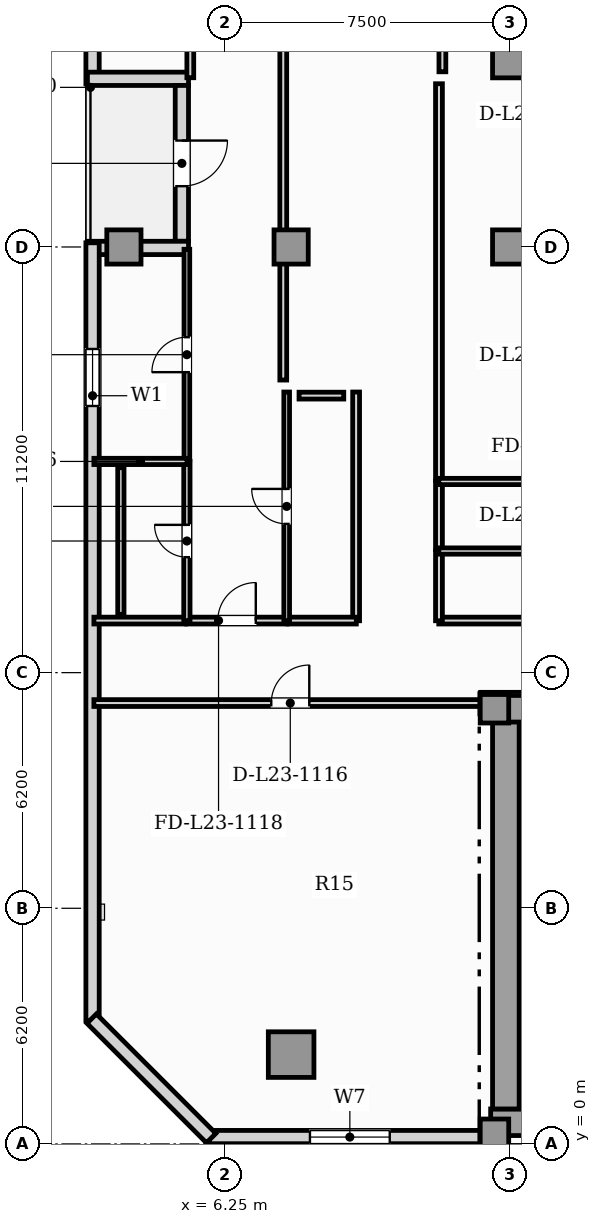
"""IFC4 building model, lengths in metres.
Left out: names, types, materials, properties, quantities, classifications, styles, units other than length and angle.
Written with IfcOpenShell. Run it as: python <this file> out.ifc"""

import sys

from ifc_helpers import new_model, si_unit, direction, frame, frame_2d, origin, origin_2d, place, context, subcontext, project, spatial, rectangle, hollow_rectangle, extrude, element, fill, save


model = new_model("IFC4")
c1 = context("Model", 3, precision=1e-05, world=origin(), true_north=direction((0.0, 1.0)))
c2 = subcontext(c1, "Body", "Model", "MODEL_VIEW")
j1 = project(units=[si_unit("LENGTHUNIT", "METRE"), si_unit("PLANEANGLEUNIT", "RADIAN")], contexts=[c1])
p1 = place(None, origin())
s1 = spatial("IfcSite", under=j1, at=p1, CompositionType="ELEMENT")
p2 = place(p1, origin())
s2 = spatial("IfcBuilding", under=s1, at=p2, CompositionType="ELEMENT")
p3 = place(p2, frame((0.0, 0.0, 96.45)))
s3 = spatial("IfcBuildingStorey", under=s2, at=p3, CompositionType="ELEMENT", Elevation=96.45)
p4 = place(p3, frame((13.25, 0.57, 0.0), z_axis=(0.0, 0.0, 1.0), x_axis=(1.0, 0.0, 0.0)))
e1 = element("IfcWall", 1, at=p4, inside=s3, PredefinedType="SHEAR", context=c2, shape_type="SweptSolid", body=[
    extrude(rectangle(XDim=31.0, YDim=0.7, at=frame_2d((15.5, 0.0))), origin(), (0.0, 0.0, 1.0), 3.6),
])
p5 = place(p3, frame((13.65, 0.92, 0.0), z_axis=(0.0, 0.0, 1.0), x_axis=(0.0, 1.0, 0.0)))
e2 = element("IfcWall", 2, at=p5, inside=s3, PredefinedType="SHEAR", context=c2, shape_type="SweptSolid", body=[
    extrude(rectangle(XDim=10.53, YDim=0.7, at=frame_2d((5.265, 0.0))), origin(), (0.0, 0.0, 1.0), 3.6),
])
p6 = place(p3, frame((13.25, 11.45, 0.0), z_axis=(0.0, 0.0, 1.0), x_axis=(1.0, 0.0, 0.0)))
e3 = element("IfcWall", 3, at=p6, inside=s3, PredefinedType="SHEAR", context=c2, shape_type="SweptSolid", body=[
    extrude(rectangle(XDim=2.95, YDim=0.7, at=frame_2d((1.475, 0.0))), origin(), (0.0, 0.0, 1.0), 3.6),
])
for number, where, z_axis, x_axis in (
    (4, (13.35, 0.28, 0.0), (0.0, 0.0, 1.0), (1.0, 0.0, 0.0)),
    (5, (13.35, 11.45, 0.0), (0.0, 0.0, 1.0), (1.0, 0.0, 0.0)),
):
    element("IfcColumn", number, at=place(p3, frame(where, z_axis=z_axis, x_axis=x_axis)), inside=s3, PredefinedType="COLUMN", context=c2, shape_type="SweptSolid", body=[
        extrude(rectangle(XDim=0.75, YDim=0.75, at=origin_2d()), origin(), (0.0, 0.0, 1.0), 3.85),
    ])
p7 = place(p3, frame((8.0, 2.35, 0.0), z_axis=(0.0, 0.0, 1.0), x_axis=(1.0, 0.0, 0.0)))
e6 = element("IfcColumn", 6, at=p7, inside=s3, PredefinedType="USERDEFINED", context=c2, shape_type="SweptSolid", body=[
    extrude(hollow_rectangle(XDim=1.2, YDim=1.2, WallThickness=0.07, at=origin_2d()), origin(), (0.0, 0.0, 1.0), 3.85),
])
for number, where, z_axis, x_axis in (
    (7, (3.6, 23.6, 0.0), (0.0, 0.0, 1.0), (1.0, 0.0, 0.0)),
    (8, (8.0, 23.6, 0.0), (0.0, 0.0, 1.0), (1.0, 0.0, 0.0)),
    (9, (13.75, 23.6, 0.0), (0.0, 0.0, 1.0), (1.0, 0.0, 0.0)),
    (10, (13.75, 28.5, 0.0), (0.0, 0.0, 1.0), (1.0, 0.0, 0.0)),
):
    element("IfcColumn", number, at=place(p3, frame(where, z_axis=z_axis, x_axis=x_axis)), inside=s3, PredefinedType="COLUMN", context=c2, shape_type="SweptSolid", body=[
        extrude(rectangle(XDim=0.9, YDim=0.9, at=origin_2d()), origin(), (0.0, 0.0, 1.0), 3.85),
    ])
p8 = place(p3, frame((5.84, 0.18, 0.0), z_axis=(0.0, 0.0, 1.0), x_axis=(1.0, 0.0, 0.0)))
e11 = element("IfcWall", 11, at=p8, inside=s3, PredefinedType="SOLIDWALL", context=c2, shape_type="SweptSolid", body=[
    extrude(rectangle(XDim=7.41, YDim=0.35, at=frame_2d((3.705, 0.0))), origin(), (0.0, 0.0, 1.0), 3.6),
])
p9 = place(p8, frame((2.655, 0.0, 0.85)))
e12 = element("IfcOpeningElement", 12, at=p9, cuts=e11, PredefinedType="OPENING", context=c2, shape_type="SweptSolid", body=[
    extrude(rectangle(XDim=2.1, YDim=2.05, at=frame_2d((1.05, 1.025))), frame((0.0, 0.185, 0.0), z_axis=(0.0, -1.0, 0.0), x_axis=(1.0, 0.0, 0.0)), (0.0, 0.0, 1.0), 0.37),
])
p10 = place(p3, frame((2.775, 39.96, 0.0), z_axis=(0.0, 0.0, 1.0), x_axis=(0.0, -1.0, 0.0)))
e13 = element("IfcWall", 13, at=p10, inside=s3, PredefinedType="SOLIDWALL", context=c2, shape_type="SweptSolid", body=[
    extrude(rectangle(XDim=12.07, YDim=0.35, at=frame_2d((6.035, 0.0))), origin(), (0.0, 0.0, 1.0), 3.6),
])
p11 = place(p10, frame((5.26, 0.0, 0.95)))
e14 = element("IfcOpeningElement", 14, at=p11, cuts=e13, PredefinedType="OPENING", context=c2, shape_type="SweptSolid", body=[
    extrude(rectangle(XDim=0.9, YDim=1.5, at=frame_2d((0.45, 0.75))), frame((0.0, 0.185, 0.0), z_axis=(0.0, -1.0, 0.0), x_axis=(1.0, 0.0, 0.0)), (0.0, 0.0, 1.0), 0.37),
])
p12 = place(p3, frame((2.64, 28.025, 0.0), z_axis=(0.0, 0.0, 1.0), x_axis=(1.0, 0.0, 0.0)))
e15 = element("IfcWall", 15, at=p12, inside=s3, PredefinedType="SOLIDWALL", context=c2, shape_type="SweptSolid", body=[
    extrude(rectangle(XDim=2.66, YDim=0.35, at=frame_2d((1.33, 0.0))), origin(), (0.0, 0.0, 1.0), 3.6),
])
p13 = place(p3, frame((5.125, 27.85, 0.0), z_axis=(0.0, 0.0, 1.0), x_axis=(0.0, -1.0, 0.0)))
e16 = element("IfcWall", 16, at=p13, inside=s3, PredefinedType="SOLIDWALL", context=c2, shape_type="SweptSolid", body=[
    extrude(rectangle(XDim=4.1, YDim=0.35, at=frame_2d((2.05, 0.0))), origin(), (0.0, 0.0, 1.0), 3.6),
])
p14 = place(p13, frame((1.45, 0.0, 0.0)))
e17 = element("IfcOpeningElement", 17, at=p14, cuts=e16, PredefinedType="OPENING", context=c2, shape_type="SweptSolid", body=[
    extrude(rectangle(XDim=1.2, YDim=2.2, at=frame_2d((0.6, 1.1))), frame((0.0, 0.185, 0.0), z_axis=(0.0, -1.0, 0.0), x_axis=(1.0, 0.0, 0.0)), (0.0, 0.0, 1.0), 0.37),
])
p15 = place(p3, frame((5.3, 23.575, 0.0), z_axis=(0.0, 0.0, 1.0), x_axis=(-1.0, 0.0, 0.0)))
e18 = element("IfcWall", 18, at=p15, inside=s3, PredefinedType="SOLIDWALL", context=c2, shape_type="SweptSolid", body=[
    extrude(rectangle(XDim=2.66, YDim=0.35, at=frame_2d((1.33, 0.0))), origin(), (0.0, 0.0, 1.0), 3.056),
])
p16 = place(p3, frame((2.775, 23.71, 0.0), z_axis=(0.0, 0.0, 1.0), x_axis=(0.0, -1.0, 0.0)))
e19 = element("IfcWall", 19, at=p16, inside=s3, PredefinedType="SOLIDWALL", context=c2, shape_type="SweptSolid", body=[
    extrude(rectangle(XDim=20.47, YDim=0.35, at=frame_2d((10.235, 0.0))), origin(), (0.0, 0.0, 1.0), 3.6),
])
p17 = place(p16, frame((2.794, 0.0, 0.9)))
e20 = element("IfcOpeningElement", 20, at=p17, cuts=e19, PredefinedType="OPENING", context=c2, shape_type="SweptSolid", body=[
    extrude(rectangle(XDim=1.5, YDim=1.95, at=frame_2d((0.75, 0.975))), frame((0.0, 0.185, 0.0), z_axis=(0.0, -1.0, 0.0), x_axis=(1.0, 0.0, 0.0)), (0.0, 0.0, 1.0), 0.37),
])
p18 = place(p3, frame((2.752, 3.295, 0.0), z_axis=(0.0, 0.0, 1.0), x_axis=(0.707134240044, -0.707079321262, 0.0)))
e21 = element("IfcWall", 21, at=p18, inside=s3, PredefinedType="SOLIDWALL", context=c2, shape_type="SweptSolid", body=[
    extrude(rectangle(XDim=4.446, YDim=0.35, at=frame_2d((2.223, 0.0))), origin(), (0.0, 0.0, 1.0), 3.6),
])
p19 = place(p3, frame((14.04, 8.52, 0.0), z_axis=(0.0, 0.0, 1.0), x_axis=(1.0, 0.0, 0.0)))
e22 = element("IfcWall", 22, at=p19, inside=s3, PredefinedType="SOLIDWALL", context=c2, shape_type="SweptSolid", body=[
    extrude(rectangle(XDim=3.4, YDim=0.22, at=frame_2d((1.7, 0.0))), origin(), (0.0, 0.0, 1.0), 3.6),
])
p20 = place(p19, frame((1.125, 0.0, 0.0)))
e23 = element("IfcOpeningElement", 23, at=p20, cuts=e22, PredefinedType="OPENING", context=c2, shape_type="SweptSolid", body=[
    extrude(rectangle(XDim=1.15, YDim=2.2, at=frame_2d((0.575, 1.1))), frame((0.0, 0.12, 0.0), z_axis=(0.0, -1.0, 0.0), x_axis=(1.0, 0.0, 0.0)), (0.0, 0.0, 1.0), 0.24),
])
p21 = place(p3, frame((2.81, 11.6, 0.0), z_axis=(0.0, 0.0, 1.0), x_axis=(1.0, 0.0, 0.0)))
e24 = element("IfcWall", 24, at=p21, inside=s3, PredefinedType="PARTITIONING", context=c2, shape_type="SweptSolid", body=[
    extrude(rectangle(XDim=10.335, YDim=0.18, at=frame_2d((5.167, 0.0))), origin(), (0.0, 0.0, 1.0), 3.6),
])
p22 = place(p21, frame((4.667, 0.0, 0.0)))
e25 = element("IfcOpeningElement", 25, at=p22, cuts=e24, PredefinedType="OPENING", context=c2, shape_type="SweptSolid", body=[
    extrude(rectangle(XDim=1.0, YDim=2.15, at=frame_2d((0.5, 1.075))), frame((0.0, 0.1, 0.0), z_axis=(0.0, -1.0, 0.0), x_axis=(1.0, 0.0, 0.0)), (0.0, 0.0, 1.0), 0.2),
])
p23 = place(p3, frame((5.252, 13.77, 0.0), z_axis=(0.0, 0.0, 1.0), x_axis=(1.0, 0.0, 0.0)))
e26 = element("IfcWall", 26, at=p23, inside=s3, PredefinedType="PARTITIONING", context=c2, shape_type="SweptSolid", body=[
    extrude(rectangle(XDim=2.636, YDim=0.18, at=frame_2d((1.318, 0.0))), origin(), (0.0, 0.0, 1.0), 3.6),
])
p24 = place(p23, frame((0.818, 0.0, 0.0)))
e27 = element("IfcOpeningElement", 27, at=p24, cuts=e26, PredefinedType="OPENING", context=c2, shape_type="SweptSolid", body=[
    extrude(rectangle(XDim=1.0, YDim=2.15, at=frame_2d((0.5, 1.075))), frame((0.0, 0.1, 0.0), z_axis=(0.0, -1.0, 0.0), x_axis=(1.0, 0.0, 0.0)), (0.0, 0.0, 1.0), 0.2),
])
p25 = place(p3, frame((2.81, 13.77, 0.0), z_axis=(0.0, 0.0, 1.0), x_axis=(1.0, 0.0, 0.0)))
e28 = element("IfcWall", 28, at=p25, inside=s3, PredefinedType="PARTITIONING", context=c2, shape_type="SweptSolid", body=[
    extrude(rectangle(XDim=2.412, YDim=0.18, at=frame_2d((1.206, 0.0))), origin(), (0.0, 0.0, 1.0), 3.6),
])
p26 = place(p3, frame((9.71, 13.765, 0.0), z_axis=(0.0, 0.0, 1.0), x_axis=(0.0, 1.0, 0.0)))
e29 = element("IfcWall", 29, at=p26, inside=s3, PredefinedType="PARTITIONING", context=c2, shape_type="SweptSolid", body=[
    extrude(rectangle(XDim=6.019, YDim=0.18, at=frame_2d((3.009, 0.0))), origin(), (0.0, 0.0, 1.0), 3.6),
])
p27 = place(p3, frame((7.918, 13.77, 0.0), z_axis=(0.0, 0.0, 1.0), x_axis=(1.0, 0.0, 0.0)))
e30 = element("IfcWall", 30, at=p27, inside=s3, PredefinedType="PARTITIONING", context=c2, shape_type="SweptSolid", body=[
    extrude(rectangle(XDim=1.797, YDim=0.18, at=frame_2d((0.898, 0.0))), origin(), (0.0, 0.0, 1.0), 3.6),
])
p28 = place(p3, frame((11.885, 13.77, 0.0), z_axis=(0.0, 0.0, 1.0), x_axis=(1.0, 0.0, 0.0)))
e31 = element("IfcWall", 31, at=p28, inside=s3, PredefinedType="PARTITIONING", context=c2, shape_type="SweptSolid", body=[
    extrude(rectangle(XDim=5.795, YDim=0.18, at=frame_2d((2.898, 0.0))), origin(), (0.0, 0.0, 1.0), 3.6),
])
p29 = place(p3, frame((11.89, 13.765, 0.0), z_axis=(0.0, 0.0, 1.0), x_axis=(0.0, 1.0, 0.0)))
e32 = element("IfcWall", 32, at=p29, inside=s3, PredefinedType="PARTITIONING", context=c2, shape_type="SweptSolid", body=[
    extrude(rectangle(XDim=1.84, YDim=0.18, at=frame_2d((0.92, 0.0))), origin(), (0.0, 0.0, 1.0), 3.6),
])
p30 = place(p3, frame((11.89, 15.635, 0.0), z_axis=(0.0, 0.0, 1.0), x_axis=(0.0, 1.0, 0.0)))
e33 = element("IfcWall", 33, at=p30, inside=s3, PredefinedType="PARTITIONING", context=c2, shape_type="SweptSolid", body=[
    extrude(rectangle(XDim=1.8, YDim=0.18, at=frame_2d((0.9, 0.0))), origin(), (0.0, 0.0, 1.0), 3.6),
])
p31 = place(p3, frame((11.89, 17.465, 0.0), z_axis=(0.0, 0.0, 1.0), x_axis=(0.0, 1.0, 0.0)))
e34 = element("IfcWall", 34, at=p31, inside=s3, PredefinedType="PARTITIONING", context=c2, shape_type="SweptSolid", body=[
    extrude(rectangle(XDim=10.43, YDim=0.18, at=frame_2d((5.215, 0.0))), origin(), (0.0, 0.0, 1.0), 3.6),
])
p32 = place(p3, frame((5.257, 13.765, 0.0), z_axis=(0.0, 0.0, 1.0), x_axis=(0.0, 1.0, 0.0)))
e35 = element("IfcWall", 35, at=p32, inside=s3, PredefinedType="PLUMBINGWALL", context=c2, shape_type="SweptSolid", body=[
    extrude(rectangle(XDim=4.198, YDim=0.165, at=frame_2d((2.099, 0.0))), origin(), (0.0, 0.0, 1.0), 3.6),
])
p33 = place(p32, frame((1.674, 0.0, 0.0)))
e36 = element("IfcOpeningElement", 36, at=p33, cuts=e35, PredefinedType="OPENING", context=c2, shape_type="SweptSolid", body=[
    extrude(rectangle(XDim=0.85, YDim=2.1, at=frame_2d((0.425, 1.05))), frame((0.0, 0.093, 0.0), z_axis=(0.0, -1.0, 0.0), x_axis=(1.0, 0.0, 0.0)), (0.0, 0.0, 1.0), 0.185),
])
p34 = place(p3, frame((5.257, 17.992, 0.0), z_axis=(0.0, 0.0, 1.0), x_axis=(0.0, 1.0, 0.0)))
e37 = element("IfcWall", 37, at=p34, inside=s3, PredefinedType="PARTITIONING", context=c2, shape_type="SweptSolid", body=[
    extrude(rectangle(XDim=5.548, YDim=0.15, at=frame_2d((2.774, 0.0))), origin(), (0.0, 0.0, 1.0), 3.6),
])
p35 = place(p34, frame((2.314, 0.0, 0.0)))
e38 = element("IfcOpeningElement", 38, at=p35, cuts=e37, PredefinedType="OPENING", context=c2, shape_type="SweptSolid", body=[
    extrude(rectangle(XDim=0.92, YDim=2.1, at=frame_2d((0.46, 1.05))), frame((0.0, 0.085, 0.0), z_axis=(0.0, -1.0, 0.0), x_axis=(1.0, 0.0, 0.0)), (0.0, 0.0, 1.0), 0.17),
])
p36 = place(p3, frame((7.883, 13.765, 0.0), z_axis=(0.0, 0.0, 1.0), x_axis=(0.0, 1.0, 0.0)))
e39 = element("IfcWall", 39, at=p36, inside=s3, PredefinedType="PARTITIONING", context=c2, shape_type="SweptSolid", body=[
    extrude(rectangle(XDim=6.019, YDim=0.15, at=frame_2d((3.009, 0.0))), origin(), (0.0, 0.0, 1.0), 3.056),
])
p37 = place(p36, frame((2.549, 0.0, 0.0)))
e40 = element("IfcOpeningElement", 40, at=p37, cuts=e39, PredefinedType="OPENING", context=c2, shape_type="SweptSolid", body=[
    extrude(rectangle(XDim=0.92, YDim=2.1, at=frame_2d((0.46, 1.05))), frame((0.0, 0.085, 0.0), z_axis=(0.0, -1.0, 0.0), x_axis=(1.0, 0.0, 0.0)), (0.0, 0.0, 1.0), 0.17),
])
p38 = place(p3, frame((2.81, 17.957, 0.0), z_axis=(0.0, 0.0, 1.0), x_axis=(1.0, 0.0, 0.0)))
e41 = element("IfcWall", 41, at=p38, inside=s3, PredefinedType="PLUMBINGWALL", context=c2, shape_type="SweptSolid", body=[
    extrude(rectangle(XDim=2.452, YDim=0.165, at=frame_2d((1.226, 0.0))), origin(), (0.0, 0.0, 1.0), 3.6),
])
for number, where, z_axis, x_axis in (
    (42, (11.885, 15.6, 0.0), (0.0, 0.0, 1.0), (1.0, 0.0, 0.0)),
    (43, (11.885, 17.43, 0.0), (0.0, 0.0, 1.0), (1.0, 0.0, 0.0)),
):
    element("IfcWall", number, at=place(p3, frame(where, z_axis=z_axis, x_axis=x_axis)), inside=s3, PredefinedType="PLUMBINGWALL", context=c2, shape_type="SweptSolid", body=[
        extrude(rectangle(XDim=5.835, YDim=0.165, at=frame_2d((2.918, 0.0))), origin(), (0.0, 0.0, 1.0), 3.6),
    ])
p39 = place(p3, frame((5.347, 28.053, 0.0), z_axis=(0.0, 0.0, 1.0), x_axis=(0.0, 1.0, 0.0)))
e44 = element("IfcWall", 44, at=p39, inside=s3, PredefinedType="PARTITIONING", context=c2, shape_type="SweptSolid", body=[
    extrude(rectangle(XDim=5.632, YDim=0.18, at=frame_2d((2.816, 0.0))), origin(), (0.0, 0.0, 1.0), 3.6),
])
p40 = place(p3, frame((7.793, 33.685, 0.0), z_axis=(0.0, 0.0, 1.0), x_axis=(0.0, -1.0, 0.0)))
e45 = element("IfcWall", 45, at=p40, inside=s3, PredefinedType="PARTITIONING", context=c2, shape_type="SweptSolid", body=[
    extrude(rectangle(XDim=13.586, YDim=0.18, at=frame_2d((6.793, 0.0))), origin(), (0.0, 0.0, 1.0), 3.056),
])
p41 = place(p3, frame((3.52, 13.935, 0.0), z_axis=(0.0, 0.0, 1.0), x_axis=(0.0, 1.0, 0.0)))
e46 = element("IfcWall", 46, at=p41, inside=s3, PredefinedType="PLUMBINGWALL", context=c2, shape_type="SweptSolid", body=[
    extrude(rectangle(XDim=3.857, YDim=0.165, at=frame_2d((1.929, 0.0))), origin(), (0.0, 0.0, 1.0), 3.6),
])
p42 = place(p3, frame((8.208, 19.689, 0.0), z_axis=(0.0, 0.0, 1.0), x_axis=(1.0, 0.0, 0.0)))
e47 = element("IfcWall", 47, at=p42, inside=s3, PredefinedType="PARTITIONING", context=c2, shape_type="SweptSolid", body=[
    extrude(rectangle(XDim=1.177, YDim=0.18, at=frame_2d((0.588, 0.0))), origin(), (0.0, 0.0, 1.0), 3.6),
])
p43 = place(p3, frame((11.98, 28.21, 0.0), z_axis=(0.0, 0.0, 1.0), x_axis=(0.0, 1.0, 0.0)))
e48 = element("IfcWall", 48, at=p43, inside=s3, PredefinedType="PARTITIONING", context=c2, shape_type="SweptSolid", body=[
    extrude(rectangle(XDim=2.867, YDim=0.18, at=frame_2d((1.434, 0.0))), origin(), (0.0, 0.0, 1.0), 3.6),
])
p44 = place(p14, frame((1.2, 0.0, 0.0), z_axis=(0.0, 0.0, 1.0), x_axis=(-1.0, 0.0, 0.0)))
e49 = element("IfcDoor", 49, at=p44, inside=s3, OperationType="SINGLE_SWING_RIGHT", PredefinedType="DOOR", context=c2, shape_type="SweptSolid", body=[
    extrude(rectangle(XDim=1.2, YDim=2.2, at=frame_2d((0.6, 1.1))), frame((0.0, 0.025, 0.0), z_axis=(0.0, -1.0, 0.0), x_axis=(1.0, 0.0, 0.0)), (0.0, 0.0, 1.0), 0.05),
])
fill(e17, e49)
p45 = place(p9, origin())
e50 = element("IfcWindow", 50, at=p45, inside=s3, PartitioningType="SINGLE_PANEL", PredefinedType="WINDOW", context=c2, shape_type="SweptSolid", body=[
    extrude(rectangle(XDim=2.1, YDim=2.05, at=frame_2d((1.05, 1.025))), frame((0.0, 0.03, 0.0), z_axis=(0.0, -1.0, 0.0), x_axis=(1.0, 0.0, 0.0)), (0.0, 0.0, 1.0), 0.06),
])
fill(e12, e50)
p46 = place(p17, origin())
e51 = element("IfcWindow", 51, at=p46, inside=s3, PartitioningType="SINGLE_PANEL", PredefinedType="WINDOW", context=c2, shape_type="SweptSolid", body=[
    extrude(rectangle(XDim=1.5, YDim=1.95, at=frame_2d((0.75, 0.975))), frame((0.0, 0.03, 0.0), z_axis=(0.0, -1.0, 0.0), x_axis=(1.0, 0.0, 0.0)), (0.0, 0.0, 1.0), 0.06),
])
fill(e20, e51)
p47 = place(p22, origin())
e52 = element("IfcDoor", 52, at=p47, inside=s3, OperationType="SINGLE_SWING_RIGHT", PredefinedType="DOOR", context=c2, shape_type="SweptSolid", body=[
    extrude(rectangle(XDim=1.0, YDim=2.15, at=frame_2d((0.5, 1.075))), frame((0.0, 0.025, 0.0), z_axis=(0.0, -1.0, 0.0), x_axis=(1.0, 0.0, 0.0)), (0.0, 0.0, 1.0), 0.05),
])
fill(e25, e52)
p48 = place(p24, origin())
e53 = element("IfcDoor", 53, at=p48, inside=s3, OperationType="SINGLE_SWING_RIGHT", PredefinedType="DOOR", context=c2, shape_type="SweptSolid", body=[
    extrude(rectangle(XDim=1.0, YDim=2.15, at=frame_2d((0.5, 1.075))), frame((0.0, 0.025, 0.0), z_axis=(0.0, -1.0, 0.0), x_axis=(1.0, 0.0, 0.0)), (0.0, 0.0, 1.0), 0.05),
])
fill(e27, e53)
p49 = place(p33, origin())
e54 = element("IfcDoor", 54, at=p49, inside=s3, OperationType="SINGLE_SWING_RIGHT", PredefinedType="DOOR", context=c2, shape_type="SweptSolid", body=[
    extrude(rectangle(XDim=0.85, YDim=2.1, at=frame_2d((0.425, 1.05))), frame((0.0, 0.025, 0.0), z_axis=(0.0, -1.0, 0.0), x_axis=(1.0, 0.0, 0.0)), (0.0, 0.0, 1.0), 0.05),
])
fill(e36, e54)
p50 = place(p35, origin())
e55 = element("IfcDoor", 55, at=p50, inside=s3, OperationType="SINGLE_SWING_LEFT", PredefinedType="DOOR", context=c2, shape_type="SweptSolid", body=[
    extrude(rectangle(XDim=0.92, YDim=2.1, at=frame_2d((0.46, 1.05))), frame((0.0, 0.025, 0.0), z_axis=(0.0, -1.0, 0.0), x_axis=(1.0, 0.0, 0.0)), (0.0, 0.0, 1.0), 0.05),
])
fill(e38, e55)
p51 = place(p37, origin())
e56 = element("IfcDoor", 56, at=p51, inside=s3, OperationType="SINGLE_SWING_RIGHT", PredefinedType="DOOR", context=c2, shape_type="SweptSolid", body=[
    extrude(rectangle(XDim=0.92, YDim=2.1, at=frame_2d((0.46, 1.05))), frame((0.0, 0.025, 0.0), z_axis=(0.0, -1.0, 0.0), x_axis=(1.0, 0.0, 0.0)), (0.0, 0.0, 1.0), 0.05),
])
fill(e40, e56)
save(model, sys.argv[1])
